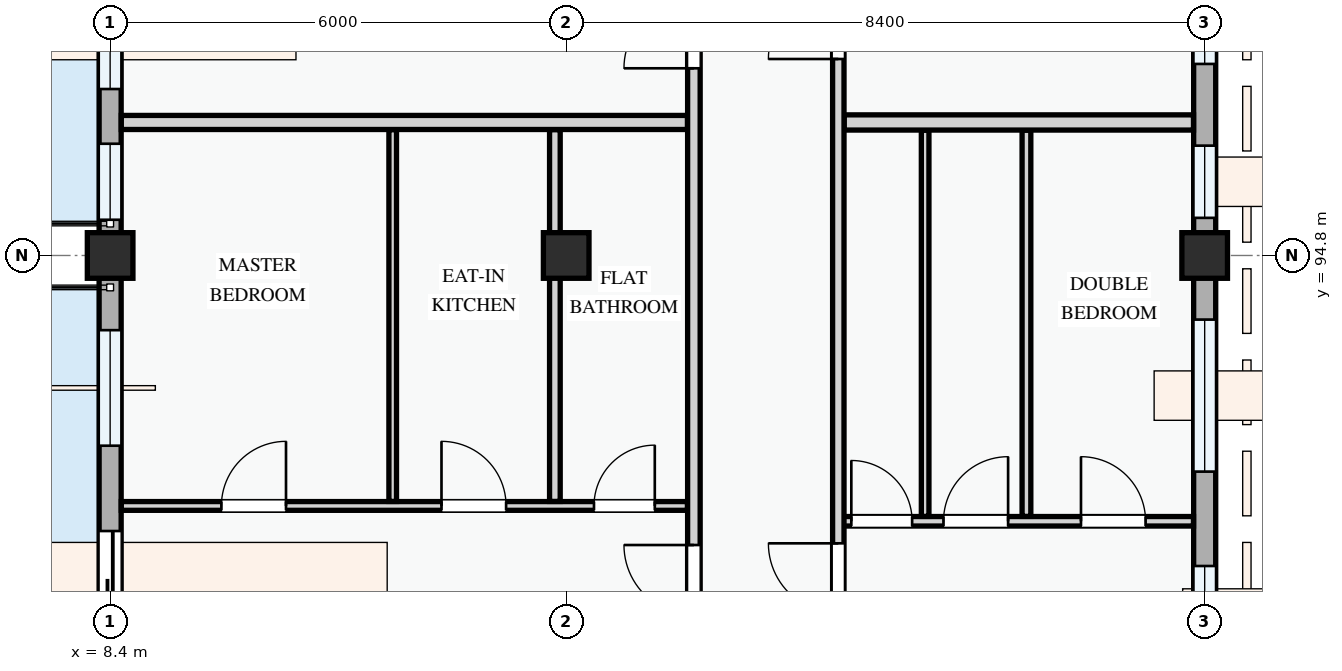
"""IFC4 building model, lengths in metres.
Left out: names, types, materials, properties, quantities, classifications, styles, units other than length and angle.
Written with IfcOpenShell. Run it as: python <this file> out.ifc"""

import sys

from ifc_helpers import new_model, si_unit, direction, frame, frame_2d, origin, origin_2d, place, context, subcontext, project, spatial, rectangle, extrude, element, fill, save


model = new_model("IFC4")
c1 = context("Model", 3, precision=1e-05, world=origin(), true_north=direction((0.0, 1.0)))
c2 = subcontext(c1, "Body", "Model", "MODEL_VIEW")
j1 = project(units=[si_unit("LENGTHUNIT", "METRE"), si_unit("PLANEANGLEUNIT", "RADIAN")], contexts=[c1])
p1 = place(None, origin())
s1 = spatial("IfcSite", under=j1, at=p1, CompositionType="ELEMENT")
p2 = place(p1, origin())
s2 = spatial("IfcBuilding", under=s1, at=p2, CompositionType="ELEMENT")
p3 = place(p2, frame((0.0, 0.0, 27.9)))
s3 = spatial("IfcBuildingStorey", under=s2, at=p3, CompositionType="ELEMENT", Elevation=27.9)
for number, where, z_axis, x_axis in (
    (1, (8.4, 94.8, 0.0), (0.0, 0.0, 1.0), (1.0, 0.0, 0.0)),
    (2, (14.4, 94.8, 0.0), (0.0, 0.0, 1.0), (1.0, 0.0, 0.0)),
    (3, (22.8, 94.8, 0.0), (0.0, 0.0, 1.0), (1.0, 0.0, 0.0)),
):
    element("IfcColumn", number, at=place(p3, frame(where, z_axis=z_axis, x_axis=x_axis)), inside=s3, PredefinedType="COLUMN", context=c2, shape_type="SweptSolid", body=[
        extrude(rectangle(XDim=0.6, YDim=0.6, at=origin_2d()), origin(), (0.0, 0.0, 1.0), 3.3),
    ])
p4 = place(p3, frame((8.4, 100.8, 0.0), z_axis=(0.0, 0.0, 1.0), x_axis=(0.0, -1.0, 0.0)))
e4 = element("IfcWall", 4, at=p4, inside=s3, PredefinedType="STANDARD", context=c2, shape_type="SweptSolid", body=[
    extrude(rectangle(XDim=6.0, YDim=0.29, at=frame_2d((3.0, 0.0))), origin(), (0.0, 0.0, 1.0), 2.445),
])
p5 = place(p4, frame((0.62, 0.0, 0.0)))
e5 = element("IfcOpeningElement", 5, at=p5, cuts=e4, PredefinedType="OPENING", context=c2, shape_type="SweptSolid", body=[
    extrude(rectangle(XDim=1.4, YDim=2.2, at=frame_2d((0.7, 1.1))), frame((0.0, 0.155, 0.0), z_axis=(0.0, -1.0, 0.0), x_axis=(1.0, 0.0, 0.0)), (0.0, 0.0, 1.0), 0.31),
])
p6 = place(p4, frame((2.51, 0.0, 0.78)))
e6 = element("IfcOpeningElement", 6, at=p6, cuts=e4, PredefinedType="OPENING", context=c2, shape_type="SweptSolid", body=[
    extrude(rectangle(XDim=1.3, YDim=1.4, at=frame_2d((0.65, 0.7))), frame((0.0, 0.155, 0.0), z_axis=(0.0, -1.0, 0.0), x_axis=(1.0, 0.0, 0.0)), (0.0, 0.0, 1.0), 0.31),
])
p7 = place(p4, frame((4.53, 0.0, 0.78)))
e7 = element("IfcOpeningElement", 7, at=p7, cuts=e4, PredefinedType="OPENING", context=c2, shape_type="SweptSolid", body=[
    extrude(rectangle(XDim=1.0, YDim=1.25, at=frame_2d((0.5, 0.625))), frame((0.0, 0.155, 0.0), z_axis=(0.0, -1.0, 0.0), x_axis=(1.0, 0.0, 0.0)), (0.0, 0.0, 1.0), 0.31),
])
p8 = place(p3, frame((8.4, 94.8, 0.0), z_axis=(0.0, 0.0, 1.0), x_axis=(0.0, -1.0, 0.0)))
e8 = element("IfcWall", 8, at=p8, inside=s3, PredefinedType="STANDARD", context=c2, shape_type="SweptSolid", body=[
    extrude(rectangle(XDim=8.4, YDim=0.29, at=frame_2d((4.2, 0.0))), origin(), (0.0, 0.0, 1.0), 2.345),
])
p9 = place(p8, frame((3.625, 0.0, 0.0)))
e9 = element("IfcOpeningElement", 9, at=p9, cuts=e8, PredefinedType="OPENING", context=c2, shape_type="SweptSolid", body=[
    extrude(rectangle(XDim=1.5, YDim=2.2, at=frame_2d((0.75, 1.1))), frame((0.0, 0.155, 0.0), z_axis=(0.0, -1.0, 0.0), x_axis=(1.0, 0.0, 0.0)), (0.0, 0.0, 1.0), 0.31),
])
p10 = place(p8, frame((0.982, 0.0, 0.78)))
e10 = element("IfcOpeningElement", 10, at=p10, cuts=e8, PredefinedType="OPENING", context=c2, shape_type="SweptSolid", body=[
    extrude(rectangle(XDim=1.52, YDim=1.42, at=frame_2d((0.76, 0.71))), frame((0.0, 0.155, 0.0), z_axis=(0.0, -1.0, 0.0), x_axis=(1.0, 0.0, 0.0)), (0.0, 0.0, 1.0), 0.31),
])
p11 = place(p8, frame((5.732, 0.0, 0.78)))
e11 = element("IfcOpeningElement", 11, at=p11, cuts=e8, PredefinedType="OPENING", context=c2, shape_type="SweptSolid", body=[
    extrude(rectangle(XDim=1.92, YDim=1.44, at=frame_2d((0.96, 0.72))), frame((0.0, 0.155, 0.0), z_axis=(0.0, -1.0, 0.0), x_axis=(1.0, 0.0, 0.0)), (0.0, 0.0, 1.0), 0.31),
])
p12 = place(p3, frame((22.8, 86.4, 0.0), z_axis=(0.0, 0.0, 1.0), x_axis=(0.0, 1.0, 0.0)))
e12 = element("IfcWall", 12, at=p12, inside=s3, PredefinedType="STANDARD", context=c2, shape_type="SweptSolid", body=[
    extrude(rectangle(XDim=8.4, YDim=0.29, at=frame_2d((4.2, 0.0))), origin(), (0.0, 0.0, 1.0), 2.425),
])
p13 = place(p12, frame((0.628, 0.0, 0.78)))
e13 = element("IfcOpeningElement", 13, at=p13, cuts=e12, PredefinedType="OPENING", context=c2, shape_type="SweptSolid", body=[
    extrude(rectangle(XDim=1.55, YDim=1.4, at=frame_2d((0.775, 0.7))), frame((0.0, 0.155, 0.0), z_axis=(0.0, -1.0, 0.0), x_axis=(1.0, 0.0, 0.0)), (0.0, 0.0, 1.0), 0.31),
])
p14 = place(p12, frame((3.065, 0.0, 0.78)))
e14 = element("IfcOpeningElement", 14, at=p14, cuts=e12, PredefinedType="OPENING", context=c2, shape_type="SweptSolid", body=[
    extrude(rectangle(XDim=1.25, YDim=1.3, at=frame_2d((0.625, 0.65))), frame((0.0, 0.155, 0.0), z_axis=(0.0, -1.0, 0.0), x_axis=(1.0, 0.0, 0.0)), (0.0, 0.0, 1.0), 0.31),
])
p15 = place(p12, frame((5.557, 0.0, 0.78)))
e15 = element("IfcOpeningElement", 15, at=p15, cuts=e12, PredefinedType="OPENING", context=c2, shape_type="SweptSolid", body=[
    extrude(rectangle(XDim=2.0, YDim=1.5, at=frame_2d((1.0, 0.75))), frame((0.0, 0.155, 0.0), z_axis=(0.0, -1.0, 0.0), x_axis=(1.0, 0.0, 0.0)), (0.0, 0.0, 1.0), 0.31),
])
p16 = place(p3, frame((22.8, 94.8, 0.0), z_axis=(0.0, 0.0, 1.0), x_axis=(0.0, 1.0, 0.0)))
e16 = element("IfcWall", 16, at=p16, inside=s3, PredefinedType="STANDARD", context=c2, shape_type="SweptSolid", body=[
    extrude(rectangle(XDim=6.0, YDim=0.29, at=frame_2d((3.0, 0.0))), origin(), (0.0, 0.0, 1.0), 2.575),
])
p17 = place(p16, frame((0.495, 0.0, 0.78)))
e17 = element("IfcOpeningElement", 17, at=p17, cuts=e16, PredefinedType="OPENING", context=c2, shape_type="SweptSolid", body=[
    extrude(rectangle(XDim=0.95, YDim=1.15, at=frame_2d((0.475, 0.575))), frame((0.0, 0.155, 0.0), z_axis=(0.0, -1.0, 0.0), x_axis=(1.0, 0.0, 0.0)), (0.0, 0.0, 1.0), 0.31),
])
p18 = place(p16, frame((2.52, 0.0, 0.78)))
e18 = element("IfcOpeningElement", 18, at=p18, cuts=e16, PredefinedType="OPENING", context=c2, shape_type="SweptSolid", body=[
    extrude(rectangle(XDim=2.52, YDim=1.5, at=frame_2d((1.26, 0.75))), frame((0.0, 0.155, 0.0), z_axis=(0.0, -1.0, 0.0), x_axis=(1.0, 0.0, 0.0)), (0.0, 0.0, 1.0), 0.31),
])
p19 = place(p3, frame((8.547, 91.505, 0.0), z_axis=(0.0, 0.0, 1.0), x_axis=(1.0, 0.0, 0.0)))
e19 = element("IfcWall", 19, at=p19, inside=s3, PredefinedType="PARTITIONING", context=c2, shape_type="SweptSolid", body=[
    extrude(rectangle(XDim=7.448, YDim=0.115, at=frame_2d((3.724, 0.0))), origin(), (0.0, 0.0, 1.0), 3.0),
])
p20 = place(p19, frame((1.317, 0.0, 0.0)))
e20 = element("IfcOpeningElement", 20, at=p20, cuts=e19, PredefinedType="OPENING", context=c2, shape_type="SweptSolid", body=[
    extrude(rectangle(XDim=0.85, YDim=2.1, at=frame_2d((0.425, 1.05))), frame((0.0, 0.067, 0.0), z_axis=(0.0, -1.0, 0.0), x_axis=(1.0, 0.0, 0.0)), (0.0, 0.0, 1.0), 0.135),
])
p21 = place(p19, frame((4.212, 0.0, 0.0)))
e21 = element("IfcOpeningElement", 21, at=p21, cuts=e19, PredefinedType="OPENING", context=c2, shape_type="SweptSolid", body=[
    extrude(rectangle(XDim=0.85, YDim=2.1, at=frame_2d((0.425, 1.05))), frame((0.0, 0.067, 0.0), z_axis=(0.0, -1.0, 0.0), x_axis=(1.0, 0.0, 0.0)), (0.0, 0.0, 1.0), 0.135),
])
p22 = place(p19, frame((6.219, 0.0, 0.0)))
e22 = element("IfcOpeningElement", 22, at=p22, cuts=e19, PredefinedType="OPENING", context=c2, shape_type="SweptSolid", body=[
    extrude(rectangle(XDim=0.8, YDim=2.1, at=frame_2d((0.4, 1.05))), frame((0.0, 0.067, 0.0), z_axis=(0.0, -1.0, 0.0), x_axis=(1.0, 0.0, 0.0)), (0.0, 0.0, 1.0), 0.135),
])
p23 = place(p3, frame((12.118, 91.564, 0.0), z_axis=(0.0, 0.0, 1.0), x_axis=(0.0, 1.0, 0.0)))
e23 = element("IfcWall", 23, at=p23, inside=s3, PredefinedType="PARTITIONING", context=c2, shape_type="SweptSolid", body=[
    extrude(rectangle(XDim=4.891, YDim=0.1, at=frame_2d((2.446, 0.0))), origin(), (0.0, 0.0, 1.0), 3.0),
])
p24 = place(p3, frame((14.251, 91.564, 0.0), z_axis=(0.0, 0.0, 1.0), x_axis=(0.0, 1.0, 0.0)))
e24 = element("IfcWall", 24, at=p24, inside=s3, PredefinedType="PARTITIONING", context=c2, shape_type="SweptSolid", body=[
    extrude(rectangle(XDim=4.891, YDim=0.14, at=frame_2d((2.446, 0.0))), origin(), (0.0, 0.0, 1.0), 2.425),
])
p25 = place(p3, frame((17.98, 91.303, 0.0), z_axis=(0.0, 0.0, 1.0), x_axis=(1.0, 0.0, 0.0)))
e25 = element("IfcWall", 25, at=p25, inside=s3, PredefinedType="PARTITIONING", context=c2, shape_type="SweptSolid", body=[
    extrude(rectangle(XDim=4.673, YDim=0.125, at=frame_2d((2.336, 0.0))), origin(), (0.0, 0.0, 1.0), 3.0),
])
p26 = place(p25, frame((0.171, 0.0, 0.0)))
e26 = element("IfcOpeningElement", 26, at=p26, cuts=e25, PredefinedType="OPENING", context=c2, shape_type="SweptSolid", body=[
    extrude(rectangle(XDim=0.8, YDim=2.1, at=frame_2d((0.4, 1.05))), frame((0.0, 0.073, 0.0), z_axis=(0.0, -1.0, 0.0), x_axis=(1.0, 0.0, 0.0)), (0.0, 0.0, 1.0), 0.145),
])
p27 = place(p25, frame((1.384, 0.0, 0.0)))
e27 = element("IfcOpeningElement", 27, at=p27, cuts=e25, PredefinedType="OPENING", context=c2, shape_type="SweptSolid", body=[
    extrude(rectangle(XDim=0.85, YDim=2.1, at=frame_2d((0.425, 1.05))), frame((0.0, 0.073, 0.0), z_axis=(0.0, -1.0, 0.0), x_axis=(1.0, 0.0, 0.0)), (0.0, 0.0, 1.0), 0.145),
])
p28 = place(p25, frame((3.193, 0.0, 0.0)))
e28 = element("IfcOpeningElement", 28, at=p28, cuts=e25, PredefinedType="OPENING", context=c2, shape_type="SweptSolid", body=[
    extrude(rectangle(XDim=0.85, YDim=2.1, at=frame_2d((0.425, 1.05))), frame((0.0, 0.073, 0.0), z_axis=(0.0, -1.0, 0.0), x_axis=(1.0, 0.0, 0.0)), (0.0, 0.0, 1.0), 0.145),
])
p29 = place(p3, frame((20.455, 91.368, 0.0), z_axis=(0.0, 0.0, 1.0), x_axis=(0.0, 1.0, 0.0)))
e29 = element("IfcWall", 29, at=p29, inside=s3, PredefinedType="PARTITIONING", context=c2, shape_type="SweptSolid", body=[
    extrude(rectangle(XDim=5.08, YDim=0.115, at=frame_2d((2.54, 0.0))), origin(), (0.0, 0.0, 1.0), 3.0),
])
p30 = place(p3, frame((19.122, 91.368, 0.0), z_axis=(0.0, 0.0, 1.0), x_axis=(0.0, 1.0, 0.0)))
e30 = element("IfcWall", 30, at=p30, inside=s3, PredefinedType="PARTITIONING", context=c2, shape_type="SweptSolid", body=[
    extrude(rectangle(XDim=5.08, YDim=0.1, at=frame_2d((2.54, 0.0))), origin(), (0.0, 0.0, 1.0), 3.0),
])
p31 = place(p3, frame((8.547, 96.55, 0.0), z_axis=(0.0, 0.0, 1.0), x_axis=(1.0, 0.0, 0.0)))
e31 = element("IfcWall", 31, at=p31, inside=s3, PredefinedType="PARTITIONING", context=c2, shape_type="SweptSolid", body=[
    extrude(rectangle(XDim=7.448, YDim=0.185, at=frame_2d((3.724, 0.0))), origin(), (0.0, 0.0, 1.0), 3.0),
])
p32 = place(p3, frame((18.057, 96.55, 0.0), z_axis=(0.0, 0.0, 1.0), x_axis=(1.0, 0.0, 0.0)))
e32 = element("IfcWall", 32, at=p32, inside=s3, PredefinedType="PARTITIONING", context=c2, shape_type="SweptSolid", body=[
    extrude(rectangle(XDim=4.596, YDim=0.2, at=frame_2d((2.298, 0.0))), origin(), (0.0, 0.0, 1.0), 3.0),
])
p33 = place(p3, frame((16.08, 86.547, 0.0), z_axis=(0.0, 0.0, 1.0), x_axis=(0.0, 1.0, 0.0)))
e33 = element("IfcWall", 33, at=p33, inside=s3, PredefinedType="PARTITIONING", context=c2, shape_type="SweptSolid", body=[
    extrude(rectangle(XDim=22.793, YDim=0.165, at=frame_2d((11.396, 0.0))), origin(), (0.0, 0.0, 1.0), 3.0),
])
p34 = place(p33, frame((3.524, 0.0, 0.0)))
e34 = element("IfcOpeningElement", 34, at=p34, cuts=e33, PredefinedType="OPENING", context=c2, shape_type="SweptSolid", body=[
    extrude(rectangle(XDim=0.92, YDim=2.1, at=frame_2d((0.46, 1.05))), frame((0.0, 0.093, 0.0), z_axis=(0.0, -1.0, 0.0), x_axis=(1.0, 0.0, 0.0)), (0.0, 0.0, 1.0), 0.185),
])
p35 = place(p33, frame((10.716, 0.0, 0.0)))
e35 = element("IfcOpeningElement", 35, at=p35, cuts=e33, PredefinedType="OPENING", context=c2, shape_type="SweptSolid", body=[
    extrude(rectangle(XDim=0.92, YDim=2.1, at=frame_2d((0.46, 1.05))), frame((0.0, 0.093, 0.0), z_axis=(0.0, -1.0, 0.0), x_axis=(1.0, 0.0, 0.0)), (0.0, 0.0, 1.0), 0.185),
])
p36 = place(p3, frame((17.98, 86.547, 0.0), z_axis=(0.0, 0.0, 1.0), x_axis=(0.0, 1.0, 0.0)))
e36 = element("IfcWall", 36, at=p36, inside=s3, PredefinedType="PARTITIONING", context=c2, shape_type="SweptSolid", body=[
    extrude(rectangle(XDim=22.793, YDim=0.15, at=frame_2d((11.396, 0.0))), origin(), (0.0, 0.0, 1.0), 3.0),
])
p37 = place(p36, frame((3.546, 0.0, 0.0)))
e37 = element("IfcOpeningElement", 37, at=p37, cuts=e36, PredefinedType="OPENING", context=c2, shape_type="SweptSolid", body=[
    extrude(rectangle(XDim=0.92, YDim=2.1, at=frame_2d((0.46, 1.05))), frame((0.0, 0.085, 0.0), z_axis=(0.0, -1.0, 0.0), x_axis=(1.0, 0.0, 0.0)), (0.0, 0.0, 1.0), 0.17),
])
p38 = place(p36, frame((10.838, 0.0, 0.0)))
e38 = element("IfcOpeningElement", 38, at=p38, cuts=e36, PredefinedType="OPENING", context=c2, shape_type="SweptSolid", body=[
    extrude(rectangle(XDim=0.92, YDim=2.1, at=frame_2d((0.46, 1.05))), frame((0.0, 0.085, 0.0), z_axis=(0.0, -1.0, 0.0), x_axis=(1.0, 0.0, 0.0)), (0.0, 0.0, 1.0), 0.17),
])
p39 = place(p6, origin())
e39 = element("IfcWindow", 39, at=p39, inside=s3, PartitioningType="SINGLE_PANEL", PredefinedType="WINDOW", context=c2, shape_type="SweptSolid", body=[
    extrude(rectangle(XDim=1.3, YDim=1.4, at=frame_2d((0.65, 0.7))), frame((0.0, 0.03, 0.0), z_axis=(0.0, -1.0, 0.0), x_axis=(1.0, 0.0, 0.0)), (0.0, 0.0, 1.0), 0.06),
])
fill(e6, e39)
p40 = place(p7, origin())
e40 = element("IfcWindow", 40, at=p40, inside=s3, PartitioningType="SINGLE_PANEL", PredefinedType="WINDOW", context=c2, shape_type="SweptSolid", body=[
    extrude(rectangle(XDim=1.0, YDim=1.25, at=frame_2d((0.5, 0.625))), frame((0.0, 0.03, 0.0), z_axis=(0.0, -1.0, 0.0), x_axis=(1.0, 0.0, 0.0)), (0.0, 0.0, 1.0), 0.06),
])
fill(e7, e40)
p41 = place(p9, frame((1.5, 0.0, 0.0), z_axis=(0.0, 0.0, 1.0), x_axis=(-1.0, 0.0, 0.0)))
e41 = element("IfcDoor", 41, at=p41, inside=s3, OperationType="SLIDING_TO_RIGHT", PredefinedType="DOOR", context=c2, shape_type="SweptSolid", body=[
    extrude(rectangle(XDim=1.5, YDim=2.2, at=frame_2d((0.75, 1.1))), frame((0.0, 0.025, 0.0), z_axis=(0.0, -1.0, 0.0), x_axis=(1.0, 0.0, 0.0)), (0.0, 0.0, 1.0), 0.05),
])
fill(e9, e41)
p42 = place(p10, origin())
e42 = element("IfcWindow", 42, at=p42, inside=s3, PartitioningType="SINGLE_PANEL", PredefinedType="WINDOW", context=c2, shape_type="SweptSolid", body=[
    extrude(rectangle(XDim=1.52, YDim=1.42, at=frame_2d((0.76, 0.71))), frame((0.0, 0.03, 0.0), z_axis=(0.0, -1.0, 0.0), x_axis=(1.0, 0.0, 0.0)), (0.0, 0.0, 1.0), 0.06),
])
fill(e10, e42)
p43 = place(p14, origin())
e43 = element("IfcWindow", 43, at=p43, inside=s3, PartitioningType="SINGLE_PANEL", PredefinedType="WINDOW", context=c2, shape_type="SweptSolid", body=[
    extrude(rectangle(XDim=1.25, YDim=1.3, at=frame_2d((0.625, 0.65))), frame((0.0, 0.03, 0.0), z_axis=(0.0, -1.0, 0.0), x_axis=(1.0, 0.0, 0.0)), (0.0, 0.0, 1.0), 0.06),
])
fill(e14, e43)
p44 = place(p15, origin())
e44 = element("IfcWindow", 44, at=p44, inside=s3, PartitioningType="DOUBLE_PANEL_VERTICAL", PredefinedType="WINDOW", context=c2, shape_type="SweptSolid", body=[
    extrude(rectangle(XDim=2.0, YDim=1.5, at=frame_2d((1.0, 0.75))), frame((0.0, 0.03, 0.0), z_axis=(0.0, -1.0, 0.0), x_axis=(1.0, 0.0, 0.0)), (0.0, 0.0, 1.0), 0.06),
])
fill(e15, e44)
p45 = place(p17, origin())
e45 = element("IfcWindow", 45, at=p45, inside=s3, PartitioningType="SINGLE_PANEL", PredefinedType="WINDOW", context=c2, shape_type="SweptSolid", body=[
    extrude(rectangle(XDim=0.95, YDim=1.15, at=frame_2d((0.475, 0.575))), frame((0.0, 0.03, 0.0), z_axis=(0.0, -1.0, 0.0), x_axis=(1.0, 0.0, 0.0)), (0.0, 0.0, 1.0), 0.06),
])
fill(e17, e45)
p46 = place(p18, origin())
e46 = element("IfcWindow", 46, at=p46, inside=s3, PartitioningType="DOUBLE_PANEL_VERTICAL", PredefinedType="WINDOW", context=c2, shape_type="SweptSolid", body=[
    extrude(rectangle(XDim=2.52, YDim=1.5, at=frame_2d((1.26, 0.75))), frame((0.0, 0.03, 0.0), z_axis=(0.0, -1.0, 0.0), x_axis=(1.0, 0.0, 0.0)), (0.0, 0.0, 1.0), 0.06),
])
fill(e18, e46)
p47 = place(p20, origin())
e47 = element("IfcDoor", 47, at=p47, inside=s3, OperationType="SINGLE_SWING_RIGHT", PredefinedType="DOOR", context=c2, shape_type="SweptSolid", body=[
    extrude(rectangle(XDim=0.85, YDim=2.1, at=frame_2d((0.425, 1.05))), frame((0.0, 0.025, 0.0), z_axis=(0.0, -1.0, 0.0), x_axis=(1.0, 0.0, 0.0)), (0.0, 0.0, 1.0), 0.05),
])
fill(e20, e47)
p48 = place(p21, origin())
e48 = element("IfcDoor", 48, at=p48, inside=s3, OperationType="SINGLE_SWING_LEFT", PredefinedType="DOOR", context=c2, shape_type="SweptSolid", body=[
    extrude(rectangle(XDim=0.85, YDim=2.1, at=frame_2d((0.425, 1.05))), frame((0.0, 0.025, 0.0), z_axis=(0.0, -1.0, 0.0), x_axis=(1.0, 0.0, 0.0)), (0.0, 0.0, 1.0), 0.05),
])
fill(e21, e48)
p49 = place(p22, origin())
e49 = element("IfcDoor", 49, at=p49, inside=s3, OperationType="SINGLE_SWING_RIGHT", PredefinedType="DOOR", context=c2, shape_type="SweptSolid", body=[
    extrude(rectangle(XDim=0.8, YDim=2.1, at=frame_2d((0.4, 1.05))), frame((0.0, 0.025, 0.0), z_axis=(0.0, -1.0, 0.0), x_axis=(1.0, 0.0, 0.0)), (0.0, 0.0, 1.0), 0.05),
])
fill(e22, e49)
p50 = place(p26, origin())
e50 = element("IfcDoor", 50, at=p50, inside=s3, OperationType="SINGLE_SWING_LEFT", PredefinedType="DOOR", context=c2, shape_type="SweptSolid", body=[
    extrude(rectangle(XDim=0.8, YDim=2.1, at=frame_2d((0.4, 1.05))), frame((0.0, 0.025, 0.0), z_axis=(0.0, -1.0, 0.0), x_axis=(1.0, 0.0, 0.0)), (0.0, 0.0, 1.0), 0.05),
])
fill(e26, e50)
p51 = place(p27, origin())
e51 = element("IfcDoor", 51, at=p51, inside=s3, OperationType="SINGLE_SWING_RIGHT", PredefinedType="DOOR", context=c2, shape_type="SweptSolid", body=[
    extrude(rectangle(XDim=0.85, YDim=2.1, at=frame_2d((0.425, 1.05))), frame((0.0, 0.025, 0.0), z_axis=(0.0, -1.0, 0.0), x_axis=(1.0, 0.0, 0.0)), (0.0, 0.0, 1.0), 0.05),
])
fill(e27, e51)
p52 = place(p28, origin())
e52 = element("IfcDoor", 52, at=p52, inside=s3, OperationType="SINGLE_SWING_LEFT", PredefinedType="DOOR", context=c2, shape_type="SweptSolid", body=[
    extrude(rectangle(XDim=0.85, YDim=2.1, at=frame_2d((0.425, 1.05))), frame((0.0, 0.025, 0.0), z_axis=(0.0, -1.0, 0.0), x_axis=(1.0, 0.0, 0.0)), (0.0, 0.0, 1.0), 0.05),
])
fill(e28, e52)
p53 = place(p34, origin())
e53 = element("IfcDoor", 53, at=p53, inside=s3, OperationType="SINGLE_SWING_RIGHT", PredefinedType="DOOR", context=c2, shape_type="SweptSolid", body=[
    extrude(rectangle(XDim=0.92, YDim=2.1, at=frame_2d((0.46, 1.05))), frame((0.0, 0.025, 0.0), z_axis=(0.0, -1.0, 0.0), x_axis=(1.0, 0.0, 0.0)), (0.0, 0.0, 1.0), 0.05),
])
fill(e34, e53)
p54 = place(p35, origin())
e54 = element("IfcDoor", 54, at=p54, inside=s3, OperationType="SINGLE_SWING_LEFT", PredefinedType="DOOR", context=c2, shape_type="SweptSolid", body=[
    extrude(rectangle(XDim=0.92, YDim=2.1, at=frame_2d((0.46, 1.05))), frame((0.0, 0.025, 0.0), z_axis=(0.0, -1.0, 0.0), x_axis=(1.0, 0.0, 0.0)), (0.0, 0.0, 1.0), 0.05),
])
fill(e35, e54)
p55 = place(p37, origin())
e55 = element("IfcDoor", 55, at=p55, inside=s3, OperationType="SINGLE_SWING_RIGHT", PredefinedType="DOOR", context=c2, shape_type="SweptSolid", body=[
    extrude(rectangle(XDim=0.92, YDim=2.1, at=frame_2d((0.46, 1.05))), frame((0.0, 0.025, 0.0), z_axis=(0.0, -1.0, 0.0), x_axis=(1.0, 0.0, 0.0)), (0.0, 0.0, 1.0), 0.05),
])
fill(e37, e55)
p56 = place(p38, origin())
e56 = element("IfcDoor", 56, at=p56, inside=s3, OperationType="SINGLE_SWING_LEFT", PredefinedType="DOOR", context=c2, shape_type="SweptSolid", body=[
    extrude(rectangle(XDim=0.92, YDim=2.1, at=frame_2d((0.46, 1.05))), frame((0.0, 0.025, 0.0), z_axis=(0.0, -1.0, 0.0), x_axis=(1.0, 0.0, 0.0)), (0.0, 0.0, 1.0), 0.05),
])
fill(e38, e56)
save(model, sys.argv[1])
